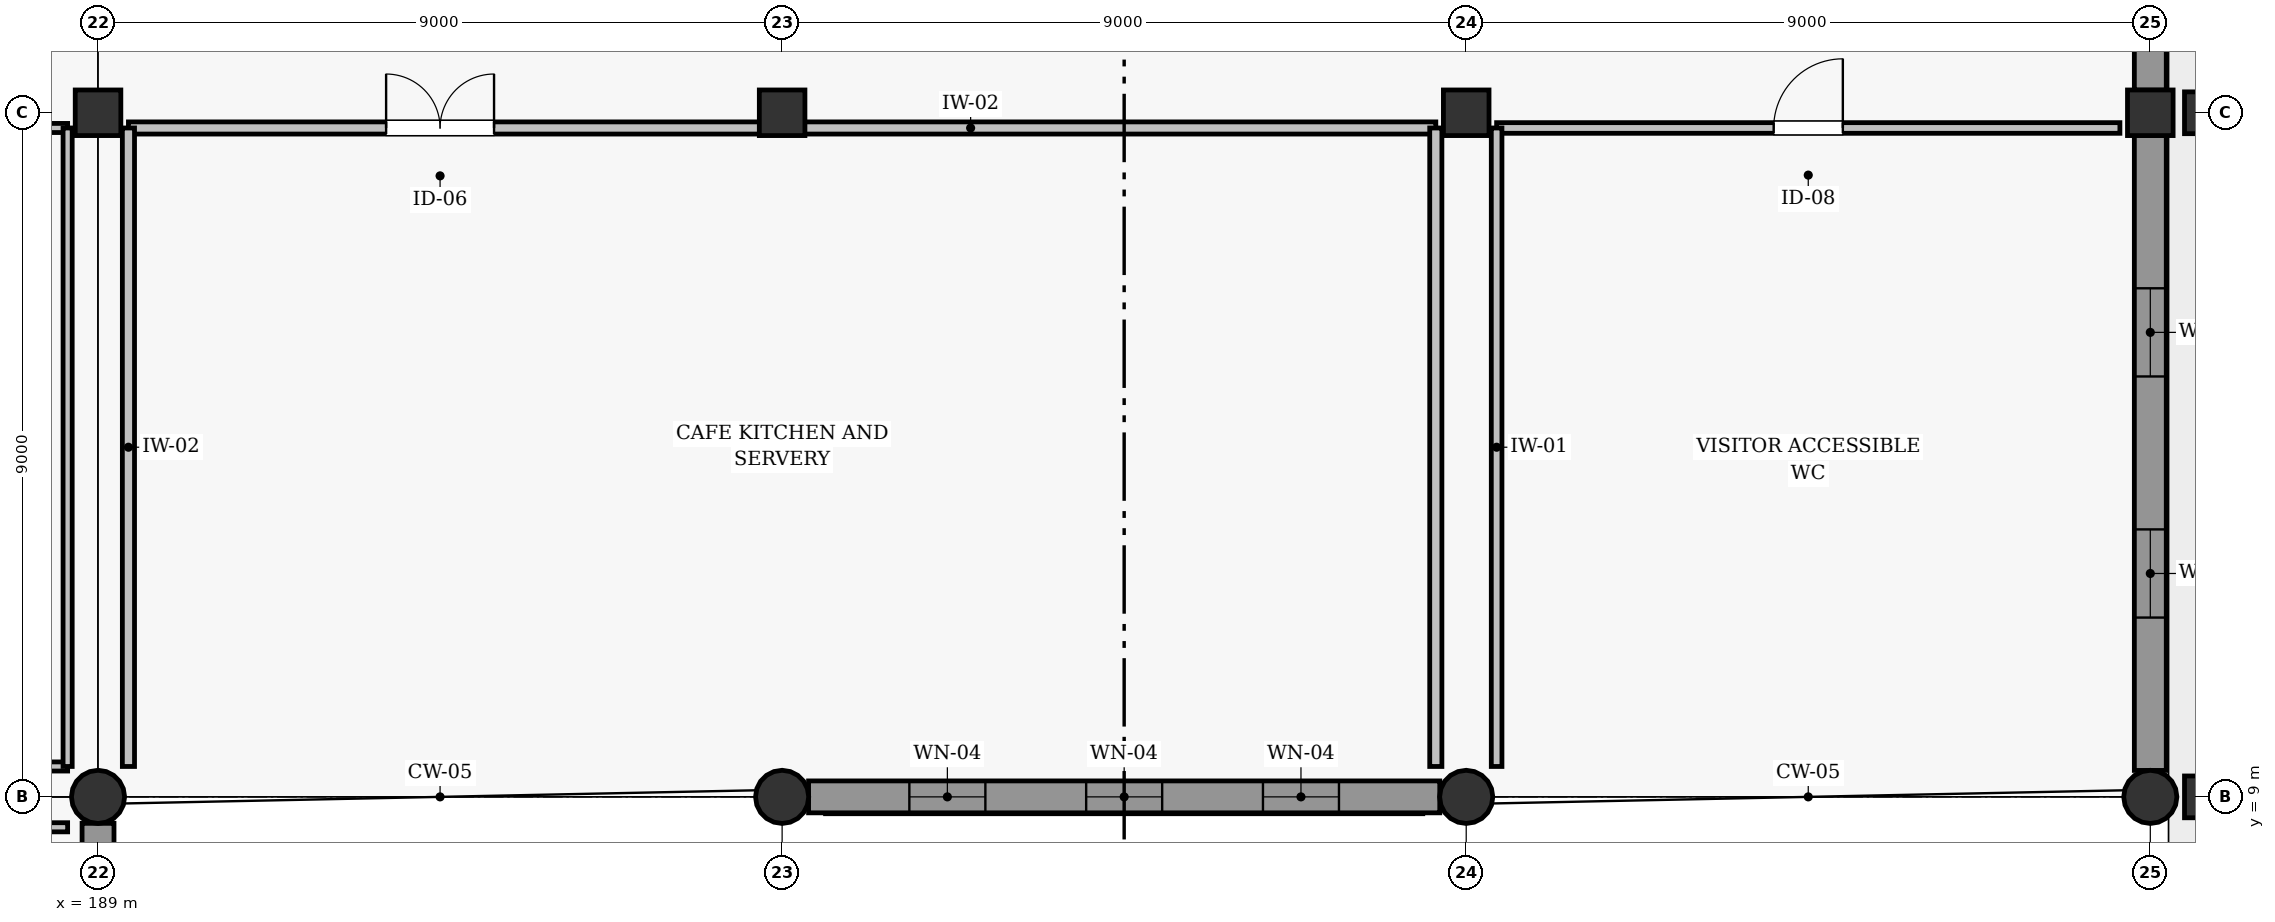
"""IFC4 building model, lengths in metres.
Left out: names, types, materials, properties, quantities, classifications, styles, units other than length and angle.
Written with IfcOpenShell. Run it as: python <this file> out.ifc"""

import sys

from ifc_helpers import new_model, si_unit, direction, frame, frame_2d, origin, origin_2d, place, context, subcontext, project, spatial, rectangle, circle, extrude, element, fill, save


model = new_model("IFC4")
c1 = context("Model", 3, precision=1e-05, world=origin(), true_north=direction((0.0, 1.0)))
c2 = subcontext(c1, "Body", "Model", "MODEL_VIEW")
j1 = project(units=[si_unit("LENGTHUNIT", "METRE"), si_unit("PLANEANGLEUNIT", "RADIAN")], contexts=[c1])
p1 = place(None, origin())
s1 = spatial("IfcSite", under=j1, at=p1, CompositionType="ELEMENT")
p2 = place(p1, origin())
s2 = spatial("IfcBuilding", under=s1, at=p2, CompositionType="ELEMENT")
p3 = place(p2, origin())
s3 = spatial("IfcBuildingStorey", under=s2, at=p3, CompositionType="ELEMENT", Elevation=0.0)
p4 = place(p3, frame((189.0, 9.0, 0.0), z_axis=(0.0, 0.0, 1.0), x_axis=(1.0, 0.0, 0.0)))
e1 = element("IfcColumn", 1, at=p4, inside=s3, PredefinedType="COLUMN", context=c2, shape_type="SweptSolid", body=[
    extrude(circle(Radius=0.35, at=origin_2d()), origin(), (0.0, 0.0, 1.0), 4.8),
])
p5 = place(p3, frame((189.0, 18.0, 0.0), z_axis=(0.0, 0.0, 1.0), x_axis=(1.0, 0.0, 0.0)))
e2 = element("IfcColumn", 2, at=p5, inside=s3, PredefinedType="COLUMN", context=c2, shape_type="SweptSolid", body=[
    extrude(rectangle(XDim=0.6, YDim=0.6, at=origin_2d()), origin(), (0.0, 0.0, 1.0), 4.8),
])
p6 = place(p3, frame((198.0, 9.0, 0.0), z_axis=(0.0, 0.0, 1.0), x_axis=(1.0, 0.0, 0.0)))
e3 = element("IfcColumn", 3, at=p6, inside=s3, PredefinedType="COLUMN", context=c2, shape_type="SweptSolid", body=[
    extrude(circle(Radius=0.35, at=origin_2d()), origin(), (0.0, 0.0, 1.0), 4.8),
])
p7 = place(p3, frame((198.0, 18.0, 0.0), z_axis=(0.0, 0.0, 1.0), x_axis=(1.0, 0.0, 0.0)))
e4 = element("IfcColumn", 4, at=p7, inside=s3, PredefinedType="COLUMN", context=c2, shape_type="SweptSolid", body=[
    extrude(rectangle(XDim=0.6, YDim=0.6, at=origin_2d()), origin(), (0.0, 0.0, 1.0), 4.8),
])
p8 = place(p3, frame((207.0, 9.0, 0.0), z_axis=(0.0, 0.0, 1.0), x_axis=(1.0, 0.0, 0.0)))
e5 = element("IfcColumn", 5, at=p8, inside=s3, PredefinedType="COLUMN", context=c2, shape_type="SweptSolid", body=[
    extrude(circle(Radius=0.35, at=origin_2d()), origin(), (0.0, 0.0, 1.0), 4.8),
])
p9 = place(p3, frame((207.0, 18.0, 0.0), z_axis=(0.0, 0.0, 1.0), x_axis=(1.0, 0.0, 0.0)))
e6 = element("IfcColumn", 6, at=p9, inside=s3, PredefinedType="COLUMN", context=c2, shape_type="SweptSolid", body=[
    extrude(rectangle(XDim=0.6, YDim=0.6, at=origin_2d()), origin(), (0.0, 0.0, 1.0), 4.8),
])
p10 = place(p3, frame((216.0, 9.0, 0.0), z_axis=(0.0, 0.0, 1.0), x_axis=(1.0, 0.0, 0.0)))
e7 = element("IfcColumn", 7, at=p10, inside=s3, PredefinedType="COLUMN", context=c2, shape_type="SweptSolid", body=[
    extrude(circle(Radius=0.35, at=origin_2d()), origin(), (0.0, 0.0, 1.0), 4.8),
])
p11 = place(p3, frame((216.0, 18.0, 0.0), z_axis=(0.0, 0.0, 1.0), x_axis=(1.0, 0.0, 0.0)))
e8 = element("IfcColumn", 8, at=p11, inside=s3, PredefinedType="COLUMN", context=c2, shape_type="SweptSolid", body=[
    extrude(rectangle(XDim=0.6, YDim=0.6, at=origin_2d()), origin(), (0.0, 0.0, 1.0), 4.8),
])
for number, where, z_axis, x_axis in (
    (9, (216.85, 9.0, 0.0), (0.0, 0.0, 1.0), (0.0, 1.0, 0.0)),
    (10, (216.85, 18.0, 0.0), (0.0, 0.0, 1.0), (0.0, 1.0, 0.0)),
):
    element("IfcColumn", number, at=place(p3, frame(where, z_axis=z_axis, x_axis=x_axis)), inside=s3, PredefinedType="PILASTER", context=c2, shape_type="SweptSolid", body=[
        extrude(rectangle(XDim=0.55, YDim=0.8, at=origin_2d()), origin(), (0.0, 0.0, 1.0), 4.8),
    ])
p12 = place(p3, frame((198.348, 9.0, 0.0), z_axis=(0.0, 0.0, 1.0), x_axis=(1.0, 0.0, 0.0)))
e11 = element("IfcWall", 11, at=p12, inside=s3, PredefinedType="SOLIDWALL", context=c2, shape_type="SweptSolid", body=[
    extrude(rectangle(XDim=8.304, YDim=0.42, at=frame_2d((4.152, 0.0))), origin(), (0.0, 0.0, 1.0), 3.962),
])
p13 = place(p12, frame((1.326, 0.0, 0.85)))
e12 = element("IfcOpeningElement", 12, at=p13, cuts=e11, PredefinedType="OPENING", context=c2, shape_type="SweptSolid", body=[
    extrude(rectangle(XDim=1.0, YDim=2.0, at=frame_2d((0.5, 1.0))), frame((0.0, 0.22, 0.0), z_axis=(0.0, -1.0, 0.0), x_axis=(1.0, 0.0, 0.0)), (0.0, 0.0, 1.0), 0.44),
])
p14 = place(p12, frame((3.652, 0.0, 0.85)))
e13 = element("IfcOpeningElement", 13, at=p14, cuts=e11, PredefinedType="OPENING", context=c2, shape_type="SweptSolid", body=[
    extrude(rectangle(XDim=1.0, YDim=2.0, at=frame_2d((0.5, 1.0))), frame((0.0, 0.22, 0.0), z_axis=(0.0, -1.0, 0.0), x_axis=(1.0, 0.0, 0.0)), (0.0, 0.0, 1.0), 0.44),
])
p15 = place(p12, frame((5.978, 0.0, 0.85)))
e14 = element("IfcOpeningElement", 14, at=p15, cuts=e11, PredefinedType="OPENING", context=c2, shape_type="SweptSolid", body=[
    extrude(rectangle(XDim=1.0, YDim=2.0, at=frame_2d((0.5, 1.0))), frame((0.0, 0.22, 0.0), z_axis=(0.0, -1.0, 0.0), x_axis=(1.0, 0.0, 0.0)), (0.0, 0.0, 1.0), 0.44),
])
p16 = place(p3, frame((189.0, 0.348, 0.0), z_axis=(0.0, 0.0, 1.0), x_axis=(0.0, 1.0, 0.0)))
e15 = element("IfcWall", 15, at=p16, inside=s3, PredefinedType="SOLIDWALL", context=c2, shape_type="SweptSolid", body=[
    extrude(rectangle(XDim=8.304, YDim=0.42, at=frame_2d((4.152, 0.0))), origin(), (0.0, 0.0, 1.0), 4.062),
])
p17 = place(p16, frame((1.848, 0.0, 0.85)))
e16 = element("IfcOpeningElement", 16, at=p17, cuts=e15, PredefinedType="OPENING", context=c2, shape_type="SweptSolid", body=[
    extrude(rectangle(XDim=1.38, YDim=1.52, at=frame_2d((0.69, 0.76))), frame((0.0, 0.22, 0.0), z_axis=(0.0, -1.0, 0.0), x_axis=(1.0, 0.0, 0.0)), (0.0, 0.0, 1.0), 0.44),
])
p18 = place(p16, frame((5.076, 0.0, 0.85)))
e17 = element("IfcOpeningElement", 17, at=p18, cuts=e15, PredefinedType="OPENING", context=c2, shape_type="SweptSolid", body=[
    extrude(rectangle(XDim=1.38, YDim=1.52, at=frame_2d((0.69, 0.76))), frame((0.0, 0.22, 0.0), z_axis=(0.0, -1.0, 0.0), x_axis=(1.0, 0.0, 0.0)), (0.0, 0.0, 1.0), 0.44),
])
p19 = place(p3, frame((216.0, 9.348, 0.0), z_axis=(0.0, 0.0, 1.0), x_axis=(0.0, 1.0, 0.0)))
e18 = element("IfcWall", 18, at=p19, inside=s3, PredefinedType="SOLIDWALL", context=c2, shape_type="SweptSolid", body=[
    extrude(rectangle(XDim=8.354, YDim=0.42, at=frame_2d((4.177, 0.0))), origin(), (0.0, 0.0, 1.0), 4.062),
])
p20 = place(p19, frame((2.011, 0.0, 0.85)))
e19 = element("IfcOpeningElement", 19, at=p20, cuts=e18, PredefinedType="OPENING", context=c2, shape_type="SweptSolid", body=[
    extrude(rectangle(XDim=1.16, YDim=1.4, at=frame_2d((0.58, 0.7))), frame((0.0, 0.22, 0.0), z_axis=(0.0, -1.0, 0.0), x_axis=(1.0, 0.0, 0.0)), (0.0, 0.0, 1.0), 0.44),
])
p21 = place(p19, frame((5.183, 0.0, 0.85)))
e20 = element("IfcOpeningElement", 20, at=p21, cuts=e18, PredefinedType="OPENING", context=c2, shape_type="SweptSolid", body=[
    extrude(rectangle(XDim=1.16, YDim=1.4, at=frame_2d((0.58, 0.7))), frame((0.0, 0.22, 0.0), z_axis=(0.0, -1.0, 0.0), x_axis=(1.0, 0.0, 0.0)), (0.0, 0.0, 1.0), 0.44),
])
p22 = place(p3, frame((216.0, 18.298, 0.0), z_axis=(0.0, 0.0, 1.0), x_axis=(0.0, 1.0, 0.0)))
e21 = element("IfcWall", 21, at=p22, inside=s3, PredefinedType="SOLIDWALL", context=c2, shape_type="SweptSolid", body=[
    extrude(rectangle(XDim=8.404, YDim=0.42, at=frame_2d((4.202, 0.0))), origin(), (0.0, 0.0, 1.0), 4.062),
])
p23 = place(p22, frame((3.377, 0.0, 0.0)))
e22 = element("IfcOpeningElement", 22, at=p23, cuts=e21, PredefinedType="OPENING", context=c2, shape_type="SweptSolid", body=[
    extrude(rectangle(XDim=1.65, YDim=2.28, at=frame_2d((0.825, 1.14))), frame((0.0, 0.22, 0.0), z_axis=(0.0, -1.0, 0.0), x_axis=(1.0, 0.0, 0.0)), (0.0, 0.0, 1.0), 0.44),
])
p24 = place(p3, frame((162.4, 8.6, 0.0), z_axis=(0.0, 0.0, 1.0), x_axis=(1.0, 0.0, 0.0)))
e23 = element("IfcWall", 23, at=p24, inside=s3, PredefinedType="PARTITIONING", context=c2, shape_type="SweptSolid", body=[
    extrude(rectangle(XDim=26.2, YDim=0.12, at=frame_2d((13.1, 0.0))), origin(), (0.0, 0.0, 1.0), 3.885),
])
p25 = place(p24, frame((12.29, 0.0, 0.0)))
e24 = element("IfcOpeningElement", 24, at=p25, cuts=e23, PredefinedType="OPENING", context=c2, shape_type="SweptSolid", body=[
    extrude(rectangle(XDim=1.62, YDim=2.14, at=frame_2d((0.81, 1.07))), frame((0.0, 0.07, 0.0), z_axis=(0.0, -1.0, 0.0), x_axis=(1.0, 0.0, 0.0)), (0.0, 0.0, 1.0), 0.14),
])
p26 = place(p3, frame((144.4, 9.4, 0.0), z_axis=(0.0, 0.0, 1.0), x_axis=(1.0, 0.0, 0.0)))
e25 = element("IfcWall", 25, at=p26, inside=s3, PredefinedType="PARTITIONING", context=c2, shape_type="SweptSolid", body=[
    extrude(rectangle(XDim=44.2, YDim=0.12, at=frame_2d((22.1, 0.0))), origin(), (0.0, 0.0, 1.0), 3.885),
])
p27 = place(p3, frame((144.4, 17.8, 0.0), z_axis=(0.0, 0.0, 1.0), x_axis=(1.0, 0.0, 0.0)))
e26 = element("IfcWall", 26, at=p27, inside=s3, PredefinedType="PARTITIONING", context=c2, shape_type="SweptSolid", body=[
    extrude(rectangle(XDim=44.2, YDim=0.12, at=frame_2d((22.1, 0.0))), origin(), (0.0, 0.0, 1.0), 3.785),
])
p28 = place(p27, frame((21.23, 0.0, 0.0)))
e27 = element("IfcOpeningElement", 27, at=p28, cuts=e26, PredefinedType="OPENING", context=c2, shape_type="SweptSolid", body=[
    extrude(rectangle(XDim=1.74, YDim=2.18, at=frame_2d((0.87, 1.09))), frame((0.0, 0.07, 0.0), z_axis=(0.0, -1.0, 0.0), x_axis=(1.0, 0.0, 0.0)), (0.0, 0.0, 1.0), 0.14),
])
p29 = place(p3, frame((188.6, 9.4, 0.0), z_axis=(0.0, 0.0, 1.0), x_axis=(0.0, 1.0, 0.0)))
e28 = element("IfcWall", 28, at=p29, inside=s3, PredefinedType="PARTITIONING", context=c2, shape_type="SweptSolid", body=[
    extrude(rectangle(XDim=8.4, YDim=0.12, at=frame_2d((4.2, 0.0))), origin(), (0.0, 0.0, 1.0), 3.785),
])
p30 = place(p3, frame((189.4, 17.8, 0.0), z_axis=(0.0, 0.0, 1.0), x_axis=(1.0, 0.0, 0.0)))
e29 = element("IfcWall", 29, at=p30, inside=s3, PredefinedType="PARTITIONING", context=c2, shape_type="SweptSolid", body=[
    extrude(rectangle(XDim=17.2, YDim=0.16, at=frame_2d((8.6, 0.0))), origin(), (0.0, 0.0, 1.0), 3.785),
])
p31 = place(p30, frame((3.39, 0.0, 0.0)))
e30 = element("IfcOpeningElement", 30, at=p31, cuts=e29, PredefinedType="OPENING", context=c2, shape_type="SweptSolid", body=[
    extrude(rectangle(XDim=1.42, YDim=2.12, at=frame_2d((0.71, 1.06))), frame((0.0, 0.09, 0.0), z_axis=(0.0, -1.0, 0.0), x_axis=(1.0, 0.0, 0.0)), (0.0, 0.0, 1.0), 0.18),
])
for number, where, z_axis, x_axis in (
    (31, (189.4, 9.4, 0.0), (0.0, 0.0, 1.0), (0.0, 1.0, 0.0)),
    (32, (206.6, 9.4, 0.0), (0.0, 0.0, 1.0), (0.0, 1.0, 0.0)),
):
    element("IfcWall", number, at=place(p3, frame(where, z_axis=z_axis, x_axis=x_axis)), inside=s3, PredefinedType="PARTITIONING", context=c2, shape_type="SweptSolid", body=[
        extrude(rectangle(XDim=8.4, YDim=0.16, at=frame_2d((4.2, 0.0))), origin(), (0.0, 0.0, 1.0), 3.785),
    ])
p32 = place(p3, frame((207.4, 17.8, 0.0), z_axis=(0.0, 0.0, 1.0), x_axis=(1.0, 0.0, 0.0)))
e33 = element("IfcWall", 33, at=p32, inside=s3, PredefinedType="PARTITIONING", context=c2, shape_type="SweptSolid", body=[
    extrude(rectangle(XDim=8.2, YDim=0.14, at=frame_2d((4.1, 0.0))), origin(), (0.0, 0.0, 1.0), 3.785),
])
p33 = place(p32, frame((3.645, 0.0, 0.0)))
e34 = element("IfcOpeningElement", 34, at=p33, cuts=e33, PredefinedType="OPENING", context=c2, shape_type="SweptSolid", body=[
    extrude(rectangle(XDim=0.91, YDim=2.04, at=frame_2d((0.455, 1.02))), frame((0.0, 0.08, 0.0), z_axis=(0.0, -1.0, 0.0), x_axis=(1.0, 0.0, 0.0)), (0.0, 0.0, 1.0), 0.16),
])
p34 = place(p3, frame((207.4, 9.4, 0.0), z_axis=(0.0, 0.0, 1.0), x_axis=(0.0, 1.0, 0.0)))
e35 = element("IfcWall", 35, at=p34, inside=s3, PredefinedType="PARTITIONING", context=c2, shape_type="SweptSolid", body=[
    extrude(rectangle(XDim=8.4, YDim=0.14, at=frame_2d((4.2, 0.0))), origin(), (0.0, 0.0, 1.0), 3.785),
])
p35 = place(p13, origin())
e36 = element("IfcWindow", 36, at=p35, inside=s3, PartitioningType="SINGLE_PANEL", PredefinedType="WINDOW", context=c2, shape_type="SweptSolid", body=[
    extrude(rectangle(XDim=1.0, YDim=2.0, at=frame_2d((0.5, 1.0))), frame((0.0, 0.03, 0.0), z_axis=(0.0, -1.0, 0.0), x_axis=(1.0, 0.0, 0.0)), (0.0, 0.0, 1.0), 0.06),
])
fill(e12, e36)
p36 = place(p14, origin())
e37 = element("IfcWindow", 37, at=p36, inside=s3, PartitioningType="SINGLE_PANEL", PredefinedType="WINDOW", context=c2, shape_type="SweptSolid", body=[
    extrude(rectangle(XDim=1.0, YDim=2.0, at=frame_2d((0.5, 1.0))), frame((0.0, 0.03, 0.0), z_axis=(0.0, -1.0, 0.0), x_axis=(1.0, 0.0, 0.0)), (0.0, 0.0, 1.0), 0.06),
])
fill(e13, e37)
p37 = place(p15, origin())
e38 = element("IfcWindow", 38, at=p37, inside=s3, PartitioningType="SINGLE_PANEL", PredefinedType="WINDOW", context=c2, shape_type="SweptSolid", body=[
    extrude(rectangle(XDim=1.0, YDim=2.0, at=frame_2d((0.5, 1.0))), frame((0.0, 0.03, 0.0), z_axis=(0.0, -1.0, 0.0), x_axis=(1.0, 0.0, 0.0)), (0.0, 0.0, 1.0), 0.06),
])
fill(e14, e38)
p38 = place(p20, origin())
e39 = element("IfcWindow", 39, at=p38, inside=s3, PartitioningType="SINGLE_PANEL", PredefinedType="WINDOW", context=c2, shape_type="SweptSolid", body=[
    extrude(rectangle(XDim=1.16, YDim=1.4, at=frame_2d((0.58, 0.7))), frame((0.0, 0.03, 0.0), z_axis=(0.0, -1.0, 0.0), x_axis=(1.0, 0.0, 0.0)), (0.0, 0.0, 1.0), 0.06),
])
fill(e19, e39)
p39 = place(p21, origin())
e40 = element("IfcWindow", 40, at=p39, inside=s3, PartitioningType="SINGLE_PANEL", PredefinedType="WINDOW", context=c2, shape_type="SweptSolid", body=[
    extrude(rectangle(XDim=1.16, YDim=1.4, at=frame_2d((0.58, 0.7))), frame((0.0, 0.03, 0.0), z_axis=(0.0, -1.0, 0.0), x_axis=(1.0, 0.0, 0.0)), (0.0, 0.0, 1.0), 0.06),
])
fill(e20, e40)
p40 = place(p31, origin())
e41 = element("IfcDoor", 41, at=p40, inside=s3, OperationType="DOUBLE_SWING_LEFT", PredefinedType="DOOR", context=c2, shape_type="SweptSolid", body=[
    extrude(rectangle(XDim=1.42, YDim=2.12, at=frame_2d((0.71, 1.06))), frame((0.0, 0.025, 0.0), z_axis=(0.0, -1.0, 0.0), x_axis=(1.0, 0.0, 0.0)), (0.0, 0.0, 1.0), 0.05),
])
fill(e30, e41)
p41 = place(p33, origin())
e42 = element("IfcDoor", 42, at=p41, inside=s3, OperationType="SINGLE_SWING_RIGHT", PredefinedType="DOOR", context=c2, shape_type="SweptSolid", body=[
    extrude(rectangle(XDim=0.91, YDim=2.04, at=frame_2d((0.455, 1.02))), frame((0.0, 0.025, 0.0), z_axis=(0.0, -1.0, 0.0), x_axis=(1.0, 0.0, 0.0)), (0.0, 0.0, 1.0), 0.05),
])
fill(e34, e42)
save(model, sys.argv[1])
